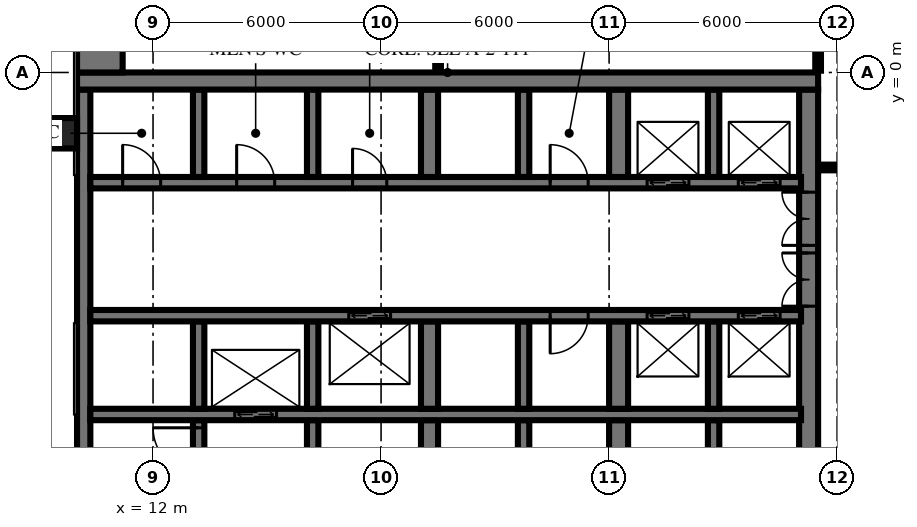
"""IFC4 building model, lengths in metres.
Left out: names, types, materials, properties, quantities, classifications, styles, units other than length and angle.
Written with IfcOpenShell. Run it as: python <this file> out.ifc"""

import sys

from ifc_helpers import new_model, si_unit, direction, frame, frame_2d, origin, origin_2d, place, context, subcontext, project, spatial, rectangle, extrude, element, fill, save


model = new_model("IFC4")
c1 = context("Model", 3, precision=1e-05, world=origin(), true_north=direction((0.0, 1.0)))
c2 = subcontext(c1, "Body", "Model", "MODEL_VIEW")
j1 = project(units=[si_unit("LENGTHUNIT", "METRE"), si_unit("PLANEANGLEUNIT", "RADIAN")], contexts=[c1])
p1 = place(None, origin())
s1 = spatial("IfcSite", under=j1, at=p1, CompositionType="ELEMENT")
p2 = place(p1, origin())
s2 = spatial("IfcBuilding", under=s1, at=p2, CompositionType="ELEMENT")
p3 = place(p2, frame((0.0, 0.0, 7.0)))
s3 = spatial("IfcBuildingStorey", under=s2, at=p3, CompositionType="ELEMENT", Elevation=7.0)
p4 = place(p3, frame((10.0, -0.225, 0.0), z_axis=(0.0, 0.0, 1.0), x_axis=(1.0, 0.0, 0.0)))
e1 = element("IfcWall", 1, at=p4, inside=s3, PredefinedType="SHEAR", context=c2, shape_type="SweptSolid", body=[
    extrude(rectangle(XDim=19.5, YDim=0.45, at=frame_2d((9.75, 0.0))), origin(), (0.0, 0.0, 1.0), 5.5),
])
p5 = place(p3, frame((10.175, -14.55, 0.0), z_axis=(0.0, 0.0, 1.0), x_axis=(0.0, 1.0, 0.0)))
e2 = element("IfcWall", 2, at=p5, inside=s3, PredefinedType="SHEAR", context=c2, shape_type="SweptSolid", body=[
    extrude(rectangle(XDim=14.1, YDim=0.35, at=frame_2d((7.05, 0.0))), origin(), (0.0, 0.0, 1.0), 5.5),
])
p6 = place(p3, frame((29.25, -14.55, 0.0), z_axis=(0.0, 0.0, 1.0), x_axis=(0.0, 1.0, 0.0)))
e3 = element("IfcWall", 3, at=p6, inside=s3, PredefinedType="SHEAR", context=c2, shape_type="SweptSolid", body=[
    extrude(rectangle(XDim=14.1, YDim=0.5, at=frame_2d((7.05, 0.0))), origin(), (0.0, 0.0, 1.0), 5.5),
])
p7 = place(p6, frame((8.4, 0.0, 0.0)))
e4 = element("IfcOpeningElement", 4, at=p7, cuts=e3, PredefinedType="OPENING", context=c2, shape_type="SweptSolid", body=[
    extrude(rectangle(XDim=1.4, YDim=2.4, at=frame_2d((0.7, 1.2))), frame((0.0, 0.26, 0.0), z_axis=(0.0, -1.0, 0.0), x_axis=(1.0, 0.0, 0.0)), (0.0, 0.0, 1.0), 0.52),
])
p8 = place(p6, frame((10.0, 0.0, 0.0)))
e5 = element("IfcOpeningElement", 5, at=p8, cuts=e3, PredefinedType="OPENING", context=c2, shape_type="SweptSolid", body=[
    extrude(rectangle(XDim=1.4, YDim=2.4, at=frame_2d((0.7, 1.2))), frame((0.0, 0.26, 0.0), z_axis=(0.0, -1.0, 0.0), x_axis=(1.0, 0.0, 0.0)), (0.0, 0.0, 1.0), 0.52),
])
p9 = place(p3, frame((10.35, -2.9, 0.0), z_axis=(0.0, 0.0, 1.0), x_axis=(1.0, 0.0, 0.0)))
e6 = element("IfcWall", 6, at=p9, inside=s3, PredefinedType="SHEAR", context=c2, shape_type="SweptSolid", body=[
    extrude(rectangle(XDim=18.7, YDim=0.3, at=frame_2d((9.35, 0.0))), origin(), (0.0, 0.0, 1.0), 5.5),
])
p10 = place(p9, frame((14.65, 0.0, 0.0)))
e7 = element("IfcOpeningElement", 7, at=p10, cuts=e6, PredefinedType="OPENING", context=c2, shape_type="SweptSolid", body=[
    extrude(rectangle(XDim=1.1, YDim=2.1, at=frame_2d((0.55, 1.05))), frame((0.0, 0.16, 0.0), z_axis=(0.0, -1.0, 0.0), x_axis=(1.0, 0.0, 0.0)), (0.0, 0.0, 1.0), 0.32),
])
p11 = place(p9, frame((17.05, 0.0, 0.0)))
e8 = element("IfcOpeningElement", 8, at=p11, cuts=e6, PredefinedType="OPENING", context=c2, shape_type="SweptSolid", body=[
    extrude(rectangle(XDim=1.1, YDim=2.1, at=frame_2d((0.55, 1.05))), frame((0.0, 0.16, 0.0), z_axis=(0.0, -1.0, 0.0), x_axis=(1.0, 0.0, 0.0)), (0.0, 0.0, 1.0), 0.32),
])
p12 = place(p9, frame((6.9, 0.0, 0.0)))
e9 = element("IfcOpeningElement", 9, at=p12, cuts=e6, PredefinedType="OPENING", context=c2, shape_type="SweptSolid", body=[
    extrude(rectangle(XDim=0.9, YDim=2.1, at=frame_2d((0.45, 1.05))), frame((0.0, 0.16, 0.0), z_axis=(0.0, -1.0, 0.0), x_axis=(1.0, 0.0, 0.0)), (0.0, 0.0, 1.0), 0.32),
])
p13 = place(p9, frame((0.85, 0.0, 0.0)))
e10 = element("IfcOpeningElement", 10, at=p13, cuts=e6, PredefinedType="OPENING", context=c2, shape_type="SweptSolid", body=[
    extrude(rectangle(XDim=1.0, YDim=2.1, at=frame_2d((0.5, 1.05))), frame((0.0, 0.16, 0.0), z_axis=(0.0, -1.0, 0.0), x_axis=(1.0, 0.0, 0.0)), (0.0, 0.0, 1.0), 0.32),
])
p14 = place(p9, frame((3.85, 0.0, 0.0)))
e11 = element("IfcOpeningElement", 11, at=p14, cuts=e6, PredefinedType="OPENING", context=c2, shape_type="SweptSolid", body=[
    extrude(rectangle(XDim=1.0, YDim=2.1, at=frame_2d((0.5, 1.05))), frame((0.0, 0.16, 0.0), z_axis=(0.0, -1.0, 0.0), x_axis=(1.0, 0.0, 0.0)), (0.0, 0.0, 1.0), 0.32),
])
p15 = place(p9, frame((12.1, 0.0, 0.0)))
e12 = element("IfcOpeningElement", 12, at=p15, cuts=e6, PredefinedType="OPENING", context=c2, shape_type="SweptSolid", body=[
    extrude(rectangle(XDim=1.0, YDim=2.1, at=frame_2d((0.5, 1.05))), frame((0.0, 0.16, 0.0), z_axis=(0.0, -1.0, 0.0), x_axis=(1.0, 0.0, 0.0)), (0.0, 0.0, 1.0), 0.32),
])
p16 = place(p3, frame((10.35, -6.4, 0.0), z_axis=(0.0, 0.0, 1.0), x_axis=(1.0, 0.0, 0.0)))
e13 = element("IfcWall", 13, at=p16, inside=s3, PredefinedType="SHEAR", context=c2, shape_type="SweptSolid", body=[
    extrude(rectangle(XDim=18.7, YDim=0.3, at=frame_2d((9.35, 0.0))), origin(), (0.0, 0.0, 1.0), 5.5),
])
p17 = place(p16, frame((14.65, 0.0, 0.0)))
e14 = element("IfcOpeningElement", 14, at=p17, cuts=e13, PredefinedType="OPENING", context=c2, shape_type="SweptSolid", body=[
    extrude(rectangle(XDim=1.1, YDim=2.1, at=frame_2d((0.55, 1.05))), frame((0.0, 0.16, 0.0), z_axis=(0.0, -1.0, 0.0), x_axis=(1.0, 0.0, 0.0)), (0.0, 0.0, 1.0), 0.32),
])
p18 = place(p16, frame((17.05, 0.0, 0.0)))
e15 = element("IfcOpeningElement", 15, at=p18, cuts=e13, PredefinedType="OPENING", context=c2, shape_type="SweptSolid", body=[
    extrude(rectangle(XDim=1.1, YDim=2.1, at=frame_2d((0.55, 1.05))), frame((0.0, 0.16, 0.0), z_axis=(0.0, -1.0, 0.0), x_axis=(1.0, 0.0, 0.0)), (0.0, 0.0, 1.0), 0.32),
])
p19 = place(p16, frame((6.8, 0.0, 0.0)))
e16 = element("IfcOpeningElement", 16, at=p19, cuts=e13, PredefinedType="OPENING", context=c2, shape_type="SweptSolid", body=[
    extrude(rectangle(XDim=1.1, YDim=2.1, at=frame_2d((0.55, 1.05))), frame((0.0, 0.16, 0.0), z_axis=(0.0, -1.0, 0.0), x_axis=(1.0, 0.0, 0.0)), (0.0, 0.0, 1.0), 0.32),
])
p20 = place(p16, frame((12.1, 0.0, 0.0)))
e17 = element("IfcOpeningElement", 17, at=p20, cuts=e13, PredefinedType="OPENING", context=c2, shape_type="SweptSolid", body=[
    extrude(rectangle(XDim=1.0, YDim=2.1, at=frame_2d((0.5, 1.05))), frame((0.0, 0.16, 0.0), z_axis=(0.0, -1.0, 0.0), x_axis=(1.0, 0.0, 0.0)), (0.0, 0.0, 1.0), 0.32),
])
p21 = place(p3, frame((10.35, -9.0, 0.0), z_axis=(0.0, 0.0, 1.0), x_axis=(1.0, 0.0, 0.0)))
e18 = element("IfcWall", 18, at=p21, inside=s3, PredefinedType="SHEAR", context=c2, shape_type="SweptSolid", body=[
    extrude(rectangle(XDim=18.7, YDim=0.3, at=frame_2d((9.35, 0.0))), origin(), (0.0, 0.0, 1.0), 5.5),
])
p22 = place(p21, frame((3.8, 0.0, 0.0)))
e19 = element("IfcOpeningElement", 19, at=p22, cuts=e18, PredefinedType="OPENING", context=c2, shape_type="SweptSolid", body=[
    extrude(rectangle(XDim=1.1, YDim=2.1, at=frame_2d((0.55, 1.05))), frame((0.0, 0.16, 0.0), z_axis=(0.0, -1.0, 0.0), x_axis=(1.0, 0.0, 0.0)), (0.0, 0.0, 1.0), 0.32),
])
for number, where, z_axis, x_axis in (
    (20, (13.2, -2.75, 0.0), (0.0, 0.0, 1.0), (0.0, 1.0, 0.0)),
    (21, (13.2, -8.85, 0.0), (0.0, 0.0, 1.0), (0.0, 1.0, 0.0)),
):
    element("IfcWall", number, at=place(p3, frame(where, z_axis=z_axis, x_axis=x_axis)), inside=s3, PredefinedType="SHEAR", context=c2, shape_type="SweptSolid", body=[
        extrude(rectangle(XDim=2.3, YDim=0.3, at=frame_2d((1.15, 0.0))), origin(), (0.0, 0.0, 1.0), 5.5),
    ])
p23 = place(p3, frame((13.2, -14.55, 0.0), z_axis=(0.0, 0.0, 1.0), x_axis=(0.0, 1.0, 0.0)))
e22 = element("IfcWall", 22, at=p23, inside=s3, PredefinedType="SHEAR", context=c2, shape_type="SweptSolid", body=[
    extrude(rectangle(XDim=5.4, YDim=0.3, at=frame_2d((2.7, 0.0))), origin(), (0.0, 0.0, 1.0), 5.5),
])
p24 = place(p23, frame((4.0, 0.0, 0.0)))
e23 = element("IfcOpeningElement", 23, at=p24, cuts=e22, PredefinedType="OPENING", context=c2, shape_type="SweptSolid", body=[
    extrude(rectangle(XDim=1.2, YDim=2.1, at=frame_2d((0.6, 1.05))), frame((0.0, 0.16, 0.0), z_axis=(0.0, -1.0, 0.0), x_axis=(1.0, 0.0, 0.0)), (0.0, 0.0, 1.0), 0.32),
])
for number, where, z_axis, x_axis in (
    (24, (16.2, -2.75, 0.0), (0.0, 0.0, 1.0), (0.0, 1.0, 0.0)),
    (25, (16.2, -8.85, 0.0), (0.0, 0.0, 1.0), (0.0, 1.0, 0.0)),
):
    element("IfcWall", number, at=place(p3, frame(where, z_axis=z_axis, x_axis=x_axis)), inside=s3, PredefinedType="SHEAR", context=c2, shape_type="SweptSolid", body=[
        extrude(rectangle(XDim=2.3, YDim=0.3, at=frame_2d((1.15, 0.0))), origin(), (0.0, 0.0, 1.0), 5.5),
    ])
p25 = place(p3, frame((16.2, -14.55, 0.0), z_axis=(0.0, 0.0, 1.0), x_axis=(0.0, 1.0, 0.0)))
e26 = element("IfcWall", 26, at=p25, inside=s3, PredefinedType="SHEAR", context=c2, shape_type="SweptSolid", body=[
    extrude(rectangle(XDim=5.4, YDim=0.3, at=frame_2d((2.7, 0.0))), origin(), (0.0, 0.0, 1.0), 5.5),
])
p26 = place(p25, frame((0.2, 0.0, 0.0)))
e27 = element("IfcOpeningElement", 27, at=p26, cuts=e26, PredefinedType="OPENING", context=c2, shape_type="SweptSolid", body=[
    extrude(rectangle(XDim=1.2, YDim=2.1, at=frame_2d((0.6, 1.05))), frame((0.0, 0.16, 0.0), z_axis=(0.0, -1.0, 0.0), x_axis=(1.0, 0.0, 0.0)), (0.0, 0.0, 1.0), 0.32),
])
for number, where, z_axis, x_axis in (
    (28, (19.275, -2.75, 0.0), (0.0, 0.0, 1.0), (0.0, 1.0, 0.0)),
    (29, (19.275, -8.85, 0.0), (0.0, 0.0, 1.0), (0.0, 1.0, 0.0)),
):
    element("IfcWall", number, at=place(p3, frame(where, z_axis=z_axis, x_axis=x_axis)), inside=s3, PredefinedType="SHEAR", context=c2, shape_type="SweptSolid", body=[
        extrude(rectangle(XDim=2.3, YDim=0.45, at=frame_2d((1.15, 0.0))), origin(), (0.0, 0.0, 1.0), 5.5),
    ])
p27 = place(p3, frame((19.275, -14.55, 0.0), z_axis=(0.0, 0.0, 1.0), x_axis=(0.0, 1.0, 0.0)))
e30 = element("IfcWall", 30, at=p27, inside=s3, PredefinedType="SHEAR", context=c2, shape_type="SweptSolid", body=[
    extrude(rectangle(XDim=5.4, YDim=0.45, at=frame_2d((2.7, 0.0))), origin(), (0.0, 0.0, 1.0), 5.5),
])
for number, where, z_axis, x_axis in (
    (31, (21.75, -2.75, 0.0), (0.0, 0.0, 1.0), (0.0, 1.0, 0.0)),
    (32, (21.75, -8.85, 0.0), (0.0, 0.0, 1.0), (0.0, 1.0, 0.0)),
):
    element("IfcWall", number, at=place(p3, frame(where, z_axis=z_axis, x_axis=x_axis)), inside=s3, PredefinedType="SHEAR", context=c2, shape_type="SweptSolid", body=[
        extrude(rectangle(XDim=2.3, YDim=0.3, at=frame_2d((1.15, 0.0))), origin(), (0.0, 0.0, 1.0), 5.5),
    ])
p28 = place(p3, frame((21.75, -14.55, 0.0), z_axis=(0.0, 0.0, 1.0), x_axis=(0.0, 1.0, 0.0)))
e33 = element("IfcWall", 33, at=p28, inside=s3, PredefinedType="SHEAR", context=c2, shape_type="SweptSolid", body=[
    extrude(rectangle(XDim=5.4, YDim=0.3, at=frame_2d((2.7, 0.0))), origin(), (0.0, 0.0, 1.0), 5.5),
])
for number, where, z_axis, x_axis in (
    (34, (24.25, -2.75, 0.0), (0.0, 0.0, 1.0), (0.0, 1.0, 0.0)),
    (35, (24.25, -8.85, 0.0), (0.0, 0.0, 1.0), (0.0, 1.0, 0.0)),
):
    element("IfcWall", number, at=place(p3, frame(where, z_axis=z_axis, x_axis=x_axis)), inside=s3, PredefinedType="SHEAR", context=c2, shape_type="SweptSolid", body=[
        extrude(rectangle(XDim=2.3, YDim=0.5, at=frame_2d((1.15, 0.0))), origin(), (0.0, 0.0, 1.0), 5.5),
    ])
p29 = place(p3, frame((24.25, -14.55, 0.0), z_axis=(0.0, 0.0, 1.0), x_axis=(0.0, 1.0, 0.0)))
e36 = element("IfcWall", 36, at=p29, inside=s3, PredefinedType="SHEAR", context=c2, shape_type="SweptSolid", body=[
    extrude(rectangle(XDim=5.4, YDim=0.5, at=frame_2d((2.7, 0.0))), origin(), (0.0, 0.0, 1.0), 5.5),
])
for number, where, z_axis, x_axis in (
    (37, (26.75, -2.75, 0.0), (0.0, 0.0, 1.0), (0.0, 1.0, 0.0)),
    (38, (26.75, -8.85, 0.0), (0.0, 0.0, 1.0), (0.0, 1.0, 0.0)),
):
    element("IfcWall", number, at=place(p3, frame(where, z_axis=z_axis, x_axis=x_axis)), inside=s3, PredefinedType="SHEAR", context=c2, shape_type="SweptSolid", body=[
        extrude(rectangle(XDim=2.3, YDim=0.3, at=frame_2d((1.15, 0.0))), origin(), (0.0, 0.0, 1.0), 5.5),
    ])
p30 = place(p3, frame((26.75, -14.55, 0.0), z_axis=(0.0, 0.0, 1.0), x_axis=(0.0, 1.0, 0.0)))
e39 = element("IfcWall", 39, at=p30, inside=s3, PredefinedType="SHEAR", context=c2, shape_type="SweptSolid", body=[
    extrude(rectangle(XDim=5.4, YDim=0.3, at=frame_2d((2.7, 0.0))), origin(), (0.0, 0.0, 1.0), 5.5),
])
p31 = place(p3, frame((10.6, 0.0, 0.0), z_axis=(0.0, 0.0, 1.0), x_axis=(0.0, 1.0, 0.0)))
e40 = element("IfcWall", 40, at=p31, inside=s3, PredefinedType="SHEAR", context=c2, shape_type="SweptSolid", body=[
    extrude(rectangle(XDim=8.0, YDim=1.2, at=frame_2d((4.0, 0.0))), origin(), (0.0, 0.0, 1.0), 5.5),
])
p32 = place(p3, frame((9.6, -1.6, 0.0), z_axis=(0.0, 0.0, 1.0), x_axis=(1.0, 0.0, 0.0)))
e41 = element("IfcColumn", 41, at=p32, inside=s3, PredefinedType="COLUMN", context=c2, shape_type="SweptSolid", body=[
    extrude(rectangle(XDim=0.8, YDim=0.8, at=origin_2d()), origin(), (0.0, 0.0, 1.0), 5.5),
])
p33 = place(p3, frame((29.5, 0.05, 0.0), z_axis=(0.0, 0.0, 1.0), x_axis=(0.0, 1.0, 0.0)))
e42 = element("IfcWall", 42, at=p33, inside=s3, PredefinedType="PARTITIONING", context=c2, shape_type="SweptSolid", body=[
    extrude(rectangle(XDim=7.77, YDim=0.15, at=frame_2d((3.885, 0.0))), origin(), (0.0, 0.0, 1.0), 5.05),
])
p34 = place(p33, frame((3.5, 0.0, 0.0)))
e43 = element("IfcOpeningElement", 43, at=p34, cuts=e42, PredefinedType="OPENING", context=c2, shape_type="SweptSolid", body=[
    extrude(rectangle(XDim=0.9, YDim=2.1, at=frame_2d((0.45, 1.05))), frame((0.0, 0.085, 0.0), z_axis=(0.0, -1.0, 0.0), x_axis=(1.0, 0.0, 0.0)), (0.0, 0.0, 1.0), 0.17),
])
p35 = place(p3, frame((19.5, 0.05, 0.0), z_axis=(0.0, 0.0, 1.0), x_axis=(0.0, 1.0, 0.0)))
e44 = element("IfcWall", 44, at=p35, inside=s3, PredefinedType="PARTITIONING", context=c2, shape_type="SweptSolid", body=[
    extrude(rectangle(XDim=7.77, YDim=0.15, at=frame_2d((3.885, 0.0))), origin(), (0.0, 0.0, 1.0), 5.05),
])
p36 = place(p35, frame((3.5, 0.0, 0.0)))
e45 = element("IfcOpeningElement", 45, at=p36, cuts=e44, PredefinedType="OPENING", context=c2, shape_type="SweptSolid", body=[
    extrude(rectangle(XDim=0.9, YDim=2.1, at=frame_2d((0.45, 1.05))), frame((0.0, 0.085, 0.0), z_axis=(0.0, -1.0, 0.0), x_axis=(1.0, 0.0, 0.0)), (0.0, 0.0, 1.0), 0.17),
])
p37 = place(p3, frame((29.55, -2.5, 0.0), z_axis=(0.0, 0.0, 1.0), x_axis=(1.0, 0.0, 0.0)))
e46 = element("IfcWall", 46, at=p37, inside=s3, PredefinedType="PARTITIONING", context=c2, shape_type="SweptSolid", body=[
    extrude(rectangle(XDim=2.35, YDim=0.15, at=frame_2d((1.175, 0.0))), origin(), (0.0, 0.0, 1.0), 5.05),
])
p38 = place(p10, origin())
e47 = element("IfcDoor", 47, at=p38, inside=s3, OperationType="DOUBLE_DOOR_SLIDING", PredefinedType="USERDEFINED", context=c2, shape_type="SweptSolid", body=[
    extrude(rectangle(XDim=1.1, YDim=2.1, at=frame_2d((0.55, 1.05))), frame((0.0, 0.025, 0.0), z_axis=(0.0, -1.0, 0.0), x_axis=(1.0, 0.0, 0.0)), (0.0, 0.0, 1.0), 0.05),
])
fill(e7, e47)
p39 = place(p11, origin())
e48 = element("IfcDoor", 48, at=p39, inside=s3, OperationType="DOUBLE_DOOR_SLIDING", PredefinedType="USERDEFINED", context=c2, shape_type="SweptSolid", body=[
    extrude(rectangle(XDim=1.1, YDim=2.1, at=frame_2d((0.55, 1.05))), frame((0.0, 0.025, 0.0), z_axis=(0.0, -1.0, 0.0), x_axis=(1.0, 0.0, 0.0)), (0.0, 0.0, 1.0), 0.05),
])
fill(e8, e48)
p40 = place(p17, origin())
e49 = element("IfcDoor", 49, at=p40, inside=s3, OperationType="DOUBLE_DOOR_SLIDING", PredefinedType="USERDEFINED", context=c2, shape_type="SweptSolid", body=[
    extrude(rectangle(XDim=1.1, YDim=2.1, at=frame_2d((0.55, 1.05))), frame((0.0, 0.025, 0.0), z_axis=(0.0, -1.0, 0.0), x_axis=(1.0, 0.0, 0.0)), (0.0, 0.0, 1.0), 0.05),
])
fill(e14, e49)
p41 = place(p18, origin())
e50 = element("IfcDoor", 50, at=p41, inside=s3, OperationType="DOUBLE_DOOR_SLIDING", PredefinedType="USERDEFINED", context=c2, shape_type="SweptSolid", body=[
    extrude(rectangle(XDim=1.1, YDim=2.1, at=frame_2d((0.55, 1.05))), frame((0.0, 0.025, 0.0), z_axis=(0.0, -1.0, 0.0), x_axis=(1.0, 0.0, 0.0)), (0.0, 0.0, 1.0), 0.05),
])
fill(e15, e50)
p42 = place(p22, origin())
e51 = element("IfcDoor", 51, at=p42, inside=s3, OperationType="DOUBLE_DOOR_SLIDING", PredefinedType="USERDEFINED", context=c2, shape_type="SweptSolid", body=[
    extrude(rectangle(XDim=1.1, YDim=2.1, at=frame_2d((0.55, 1.05))), frame((0.0, 0.025, 0.0), z_axis=(0.0, -1.0, 0.0), x_axis=(1.0, 0.0, 0.0)), (0.0, 0.0, 1.0), 0.05),
])
fill(e19, e51)
p43 = place(p19, origin())
e52 = element("IfcDoor", 52, at=p43, inside=s3, OperationType="DOUBLE_DOOR_SLIDING", PredefinedType="USERDEFINED", context=c2, shape_type="SweptSolid", body=[
    extrude(rectangle(XDim=1.1, YDim=2.1, at=frame_2d((0.55, 1.05))), frame((0.0, 0.025, 0.0), z_axis=(0.0, -1.0, 0.0), x_axis=(1.0, 0.0, 0.0)), (0.0, 0.0, 1.0), 0.05),
])
fill(e16, e52)
p44 = place(p7, origin())
e53 = element("IfcDoor", 53, at=p44, inside=s3, OperationType="DOUBLE_DOOR_SINGLE_SWING", PredefinedType="DOOR", context=c2, shape_type="SweptSolid", body=[
    extrude(rectangle(XDim=1.4, YDim=2.4, at=frame_2d((0.7, 1.2))), frame((0.0, 0.025, 0.0), z_axis=(0.0, -1.0, 0.0), x_axis=(1.0, 0.0, 0.0)), (0.0, 0.0, 1.0), 0.05),
])
fill(e4, e53)
p45 = place(p8, origin())
e54 = element("IfcDoor", 54, at=p45, inside=s3, OperationType="DOUBLE_DOOR_SINGLE_SWING", PredefinedType="DOOR", context=c2, shape_type="SweptSolid", body=[
    extrude(rectangle(XDim=1.4, YDim=2.4, at=frame_2d((0.7, 1.2))), frame((0.0, 0.025, 0.0), z_axis=(0.0, -1.0, 0.0), x_axis=(1.0, 0.0, 0.0)), (0.0, 0.0, 1.0), 0.05),
])
fill(e5, e54)
p46 = place(p12, origin())
e55 = element("IfcDoor", 55, at=p46, inside=s3, OperationType="SINGLE_SWING_RIGHT", PredefinedType="DOOR", context=c2, shape_type="SweptSolid", body=[
    extrude(rectangle(XDim=0.9, YDim=2.1, at=frame_2d((0.45, 1.05))), frame((0.0, 0.025, 0.0), z_axis=(0.0, -1.0, 0.0), x_axis=(1.0, 0.0, 0.0)), (0.0, 0.0, 1.0), 0.05),
])
fill(e9, e55)
p47 = place(p13, origin())
e56 = element("IfcDoor", 56, at=p47, inside=s3, OperationType="SINGLE_SWING_RIGHT", PredefinedType="DOOR", context=c2, shape_type="SweptSolid", body=[
    extrude(rectangle(XDim=1.0, YDim=2.1, at=frame_2d((0.5, 1.05))), frame((0.0, 0.025, 0.0), z_axis=(0.0, -1.0, 0.0), x_axis=(1.0, 0.0, 0.0)), (0.0, 0.0, 1.0), 0.05),
])
fill(e10, e56)
p48 = place(p14, origin())
e57 = element("IfcDoor", 57, at=p48, inside=s3, OperationType="SINGLE_SWING_RIGHT", PredefinedType="DOOR", context=c2, shape_type="SweptSolid", body=[
    extrude(rectangle(XDim=1.0, YDim=2.1, at=frame_2d((0.5, 1.05))), frame((0.0, 0.025, 0.0), z_axis=(0.0, -1.0, 0.0), x_axis=(1.0, 0.0, 0.0)), (0.0, 0.0, 1.0), 0.05),
])
fill(e11, e57)
p49 = place(p15, origin())
e58 = element("IfcDoor", 58, at=p49, inside=s3, OperationType="SINGLE_SWING_RIGHT", PredefinedType="DOOR", context=c2, shape_type="SweptSolid", body=[
    extrude(rectangle(XDim=1.0, YDim=2.1, at=frame_2d((0.5, 1.05))), frame((0.0, 0.025, 0.0), z_axis=(0.0, -1.0, 0.0), x_axis=(1.0, 0.0, 0.0)), (0.0, 0.0, 1.0), 0.05),
])
fill(e12, e58)
p50 = place(p20, frame((0.5, 0.0, 0.0), z_axis=(0.0, 0.0, 1.0), x_axis=(-1.0, 0.0, 0.0)))
e59 = element("IfcDoor", 59, at=p50, inside=s3, OperationType="SINGLE_SWING_LEFT", PredefinedType="DOOR", context=c2, shape_type="SweptSolid", body=[
    extrude(rectangle(XDim=1.0, YDim=2.1, at=frame_2d((0.0, 1.05))), frame((0.0, -0.025, 0.0), z_axis=(0.0, 1.0, 0.0), x_axis=(-1.0, 0.0, 0.0)), (0.0, 0.0, 1.0), 0.05),
])
fill(e17, e59)
p51 = place(p24, origin())
e60 = element("IfcDoor", 60, at=p51, inside=s3, OperationType="SINGLE_SWING_LEFT", PredefinedType="DOOR", context=c2, shape_type="SweptSolid", body=[
    extrude(rectangle(XDim=1.2, YDim=2.1, at=frame_2d((0.6, 1.05))), frame((0.0, 0.025, 0.0), z_axis=(0.0, -1.0, 0.0), x_axis=(1.0, 0.0, 0.0)), (0.0, 0.0, 1.0), 0.05),
])
fill(e23, e60)
save(model, sys.argv[1])
